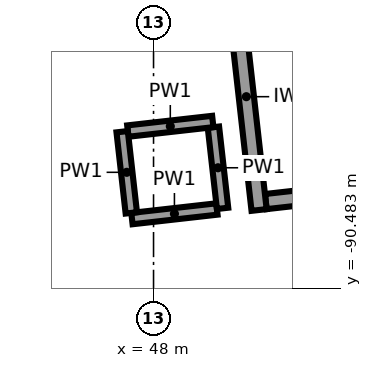
"""IFC4 building model, lengths in metres.
Left out: names, types, materials, properties, quantities, classifications, styles, units other than length and angle.
Written with IfcOpenShell. Run it as: python <this file> out.ifc"""

import sys

from ifc_helpers import new_model, si_unit, direction, frame, frame_2d, origin, place, context, subcontext, project, spatial, rectangle, extrude, element, save


model = new_model("IFC4")
c1 = context("Model", 3, precision=1e-05, world=origin(), true_north=direction((0.0, 1.0)))
c2 = subcontext(c1, "Body", "Model", "MODEL_VIEW")
j1 = project(units=[si_unit("LENGTHUNIT", "METRE"), si_unit("PLANEANGLEUNIT", "RADIAN")], contexts=[c1])
p1 = place(None, origin())
s1 = spatial("IfcSite", under=j1, at=p1, CompositionType="ELEMENT")
p2 = place(p1, origin())
s2 = spatial("IfcBuilding", under=s1, at=p2, CompositionType="ELEMENT")
p3 = place(p2, frame((0.0, 0.0, 6.5)))
s3 = spatial("IfcBuildingStorey", under=s2, at=p3, CompositionType="ELEMENT", Elevation=6.5)
p4 = place(p3, frame((49.389, -89.454, 0.0), z_axis=(0.0, 0.0, 1.0), x_axis=(-0.111976588553, 0.993710845073, 0.0)))
e1 = element("IfcWall", 1, at=p4, inside=s3, PredefinedType="SHEAR", context=c2, shape_type="SweptSolid", body=[
    extrude(rectangle(XDim=3.0, YDim=0.2, at=frame_2d((1.5, 0.0))), origin(), (0.0, 0.0, 1.0), 5.15),
])
p5 = place(p3, frame((49.477, -89.343, 0.0), z_axis=(0.0, 0.0, 1.0), x_axis=(0.993718105662, 0.11191213732, 0.0)))
e2 = element("IfcWall", 2, at=p5, inside=s3, PredefinedType="SHEAR", context=c2, shape_type="SweptSolid", body=[
    extrude(rectangle(XDim=1.9, YDim=0.2, at=frame_2d((0.95, 0.0))), origin(), (0.0, 0.0, 1.0), 5.15),
])
p6 = place(p3, frame((47.716, -89.567, 0.0), z_axis=(0.0, 0.0, 1.0), x_axis=(0.993710504932, 0.11197960702, 0.0)))
e3 = element("IfcWall", 3, at=p6, inside=s3, PredefinedType="PARTITIONING", context=c2, shape_type="SweptSolid", body=[
    extrude(rectangle(XDim=1.125, YDim=0.15, at=frame_2d((0.562, 0.0))), origin(), (0.0, 0.0, 1.0), 5.15),
])
p7 = place(p3, frame((48.908, -89.432, 0.0), z_axis=(0.0, 0.0, 1.0), x_axis=(-0.111951742856, 0.993713644503, 0.0)))
e4 = element("IfcWall", 4, at=p7, inside=s3, PredefinedType="PARTITIONING", context=c2, shape_type="SweptSolid", body=[
    extrude(rectangle(XDim=1.075, YDim=0.15, at=frame_2d((0.538, 0.0))), origin(), (0.0, 0.0, 1.0), 5.15),
])
p8 = place(p3, frame((48.78, -88.29, 0.0), z_axis=(0.0, 0.0, 1.0), x_axis=(-0.993710504932, -0.11197960702, 0.0)))
e5 = element("IfcWall", 5, at=p8, inside=s3, PredefinedType="PARTITIONING", context=c2, shape_type="SweptSolid", body=[
    extrude(rectangle(XDim=1.125, YDim=0.15, at=frame_2d((0.562, 0.0))), origin(), (0.0, 0.0, 1.0), 5.15),
])
p9 = place(p3, frame((47.587, -88.424, 0.0), z_axis=(0.0, 0.0, 1.0), x_axis=(0.111951742856, -0.993713644503, 0.0)))
e6 = element("IfcWall", 6, at=p9, inside=s3, PredefinedType="PARTITIONING", context=c2, shape_type="SweptSolid", body=[
    extrude(rectangle(XDim=1.075, YDim=0.15, at=frame_2d((0.538, 0.0))), origin(), (0.0, 0.0, 1.0), 5.15),
])
save(model, sys.argv[1])
